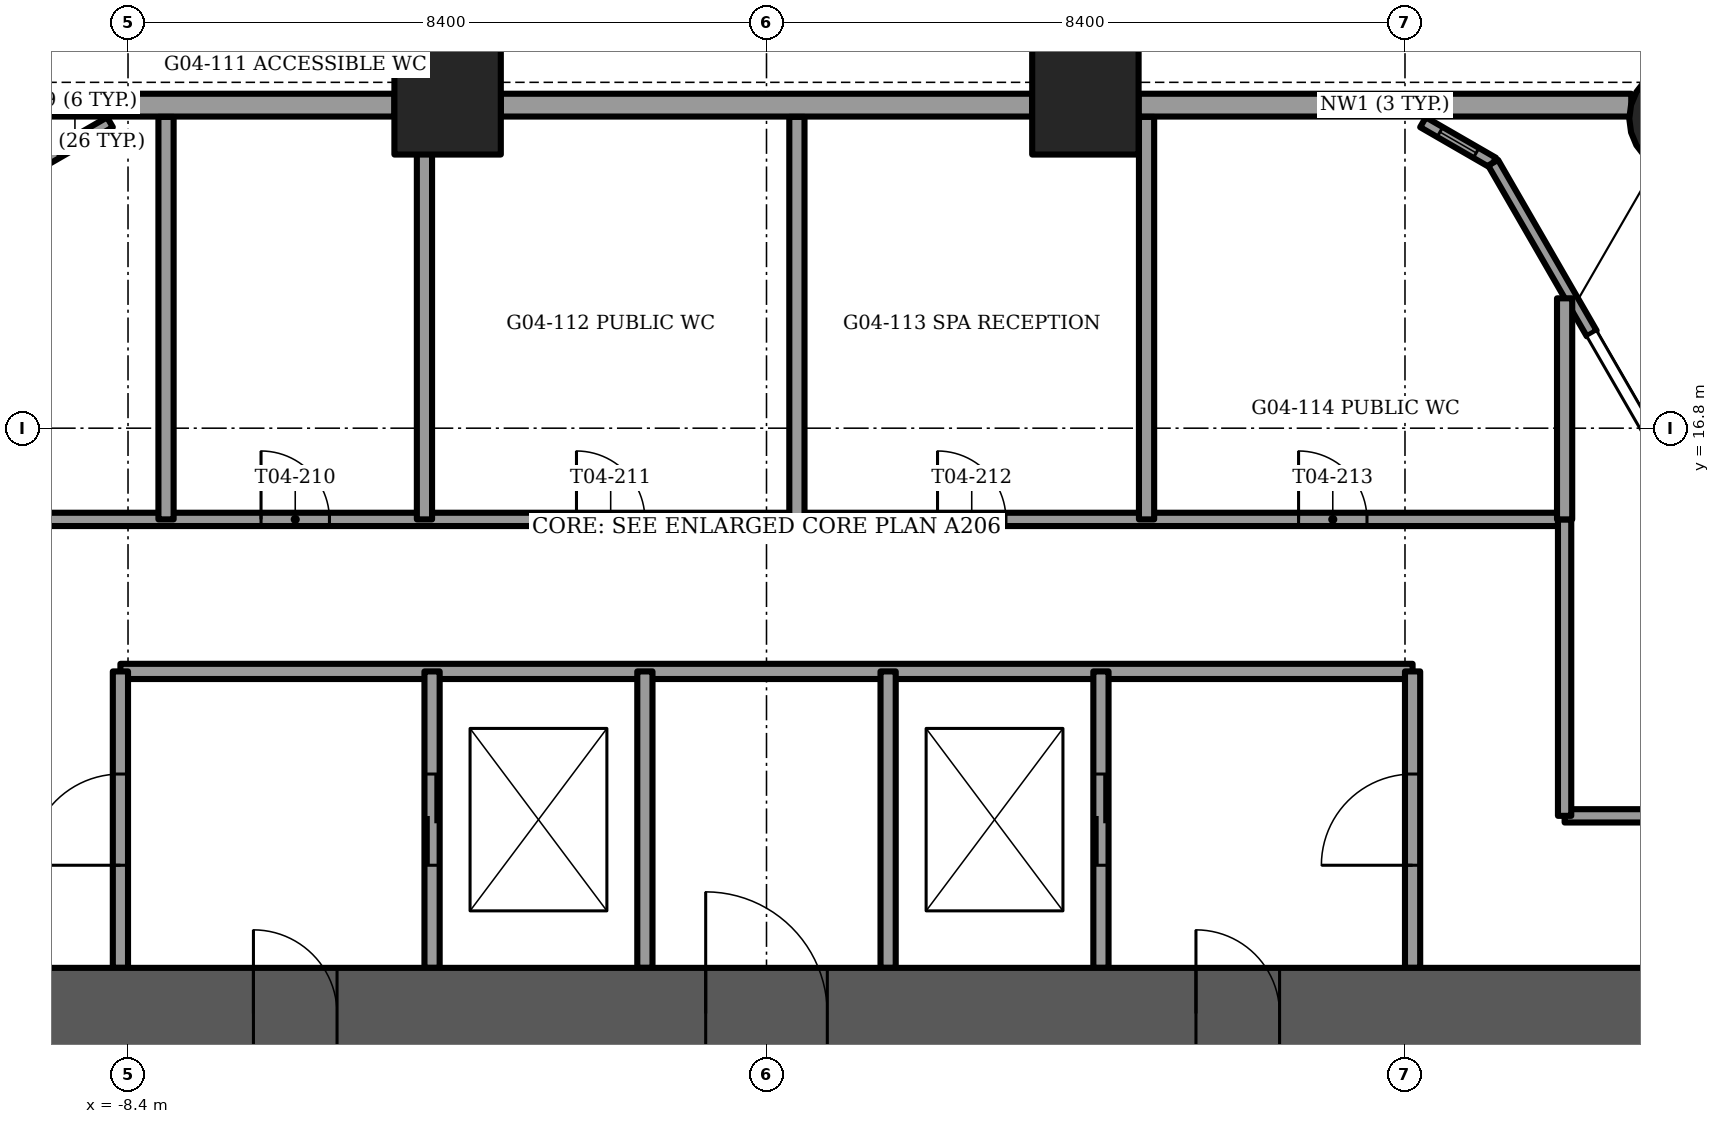
"""IFC4 building model, lengths in metres.
Left out: names, types, materials, properties, quantities, classifications, styles, units other than length and angle.
Written with IfcOpenShell. Run it as: python <this file> out.ifc"""

import sys

from ifc_helpers import new_model, si_unit, direction, frame, frame_2d, origin, origin_2d, place, context, subcontext, project, spatial, rectangle, circle, extrude, element, fill, save


model = new_model("IFC4")
c1 = context("Model", 3, precision=1e-05, world=origin(), true_north=direction((0.0, 1.0)))
c2 = subcontext(c1, "Body", "Model", "MODEL_VIEW")
j1 = project(units=[si_unit("LENGTHUNIT", "METRE"), si_unit("PLANEANGLEUNIT", "RADIAN")], contexts=[c1])
p1 = place(None, origin())
s1 = spatial("IfcSite", under=j1, at=p1, CompositionType="ELEMENT")
p2 = place(p1, origin())
s2 = spatial("IfcBuilding", under=s1, at=p2, CompositionType="ELEMENT")
p3 = place(p2, frame((0.0, 0.0, 19.0)))
s3 = spatial("IfcBuildingStorey", under=s2, at=p3, CompositionType="ELEMENT", Elevation=19.0)
p4 = place(p3, frame((12.051, 20.872, -1.2), z_axis=(0.0, 0.0, 1.0), x_axis=(1.0, 0.0, 0.0)))
e1 = element("IfcColumn", 1, at=p4, inside=s3, PredefinedType="COLUMN", context=c2, shape_type="SweptSolid", body=[
    extrude(circle(Radius=0.7, at=origin_2d()), origin(), (0.0, 0.0, 1.0), 4.5),
])
for number, where, z_axis, x_axis in (
    (2, (4.195, 21.1, -1.2), (0.0, 0.0, 1.0), (1.0, 0.0, 0.0)),
    (3, (-4.195, 21.1, -1.2), (0.0, 0.0, 1.0), (1.0, 0.0, 0.0)),
):
    element("IfcColumn", number, at=place(p3, frame(where, z_axis=z_axis, x_axis=x_axis)), inside=s3, PredefinedType="COLUMN", context=c2, shape_type="SweptSolid", body=[
        extrude(rectangle(XDim=1.4, YDim=1.4, at=origin_2d()), origin(), (0.0, 0.0, 1.0), 4.5),
    ])
p5 = place(p3, frame((-12.0, 9.1, -0.3), z_axis=(0.0, 0.0, 1.0), x_axis=(1.0, 0.0, 0.0)))
e4 = element("IfcWall", 4, at=p5, inside=s3, PredefinedType="SHEAR", context=c2, shape_type="SweptSolid", body=[
    extrude(rectangle(XDim=24.0, YDim=1.2, at=frame_2d((12.0, 0.0))), origin(), (0.0, 0.0, 1.0), 4.5),
])
p6 = place(p5, frame((11.2, 0.0, 0.0)))
e5 = element("IfcOpeningElement", 5, at=p6, cuts=e4, PredefinedType="OPENING", context=c2, shape_type="SweptSolid", body=[
    extrude(rectangle(XDim=1.6, YDim=2.1, at=frame_2d((0.8, 1.05))), frame((0.0, 0.6, 0.0), z_axis=(0.0, -1.0, 0.0), x_axis=(1.0, 0.0, 0.0)), (0.0, 0.0, 1.0), 1.2),
])
p7 = place(p5, frame((5.25, 0.0, 0.0)))
e6 = element("IfcOpeningElement", 6, at=p7, cuts=e4, PredefinedType="OPENING", context=c2, shape_type="SweptSolid", body=[
    extrude(rectangle(XDim=1.1, YDim=2.1, at=frame_2d((0.55, 1.05))), frame((0.0, 0.6, 0.0), z_axis=(0.0, -1.0, 0.0), x_axis=(1.0, 0.0, 0.0)), (0.0, 0.0, 1.0), 1.2),
])
p8 = place(p5, frame((17.65, 0.0, 0.0)))
e7 = element("IfcOpeningElement", 7, at=p8, cuts=e4, PredefinedType="OPENING", context=c2, shape_type="SweptSolid", body=[
    extrude(rectangle(XDim=1.1, YDim=2.1, at=frame_2d((0.55, 1.05))), frame((0.0, 0.6, 0.0), z_axis=(0.0, -1.0, 0.0), x_axis=(1.0, 0.0, 0.0)), (0.0, 0.0, 1.0), 1.2),
])
p9 = place(p3, frame((11.377, 21.05, 0.0), z_axis=(0.0, 0.0, 1.0), x_axis=(-1.0, 0.0, 0.0)))
e8 = element("IfcWall", 8, at=p9, inside=s3, PredefinedType="SOLIDWALL", context=c2, shape_type="SweptSolid", body=[
    extrude(rectangle(XDim=6.481, YDim=0.3, at=frame_2d((3.241, 0.0))), origin(), (0.0, 0.0, 1.0), 3.3),
])
p10 = place(p3, frame((3.495, 21.05, 0.0), z_axis=(0.0, 0.0, 1.0), x_axis=(-1.0, 0.0, 0.0)))
e9 = element("IfcWall", 9, at=p10, inside=s3, PredefinedType="SOLIDWALL", context=c2, shape_type="SweptSolid", body=[
    extrude(rectangle(XDim=6.991, YDim=0.3, at=frame_2d((3.495, 0.0))), origin(), (0.0, 0.0, 1.0), 3.3),
])
p11 = place(p3, frame((-4.896, 21.05, 0.0), z_axis=(0.0, 0.0, 1.0), x_axis=(-1.0, 0.0, 0.0)))
e10 = element("IfcWall", 10, at=p11, inside=s3, PredefinedType="SOLIDWALL", context=c2, shape_type="SweptSolid", body=[
    extrude(rectangle(XDim=6.481, YDim=0.3, at=frame_2d((3.241, 0.0))), origin(), (0.0, 0.0, 1.0), 3.3),
])
p12 = place(p3, frame((10.856, 18.046, 0.0), z_axis=(0.0, 0.0, 1.0), x_axis=(-0.499945140294, 0.866057074734, 0.0)))
e11 = element("IfcWall", 11, at=p12, inside=s3, PredefinedType="SOLIDWALL", context=c2, shape_type="SweptSolid", body=[
    extrude(rectangle(XDim=2.594, YDim=0.15, at=frame_2d((1.297, 0.0))), origin(), (0.0, 0.0, 1.0), 4.2),
])
p13 = place(p3, frame((-8.637, 20.825, 0.0), z_axis=(0.0, 0.0, 1.0), x_axis=(-0.866048165231, -0.499960573946, 0.0)))
e12 = element("IfcWall", 12, at=p13, inside=s3, PredefinedType="SOLIDWALL", context=c2, shape_type="SweptSolid", body=[
    extrude(rectangle(XDim=1.065, YDim=0.15, at=frame_2d((0.532, 0.0))), origin(), (0.0, 0.0, 1.0), 4.2),
])
p14 = place(p13, frame((0.258, 0.0, 0.15)))
e13 = element("IfcOpeningElement", 13, at=p14, cuts=e12, PredefinedType="OPENING", context=c2, shape_type="SweptSolid", body=[
    extrude(rectangle(XDim=0.55, YDim=3.6, at=frame_2d((0.275, 1.8))), frame((0.0, 0.075, 0.0), z_axis=(0.0, -1.0, 0.0), x_axis=(1.0, 0.0, 0.0)), (0.0, 0.0, 1.0), 0.15),
])
p15 = place(p3, frame((9.56, 20.292, 0.0), z_axis=(0.0, 0.0, 1.0), x_axis=(-0.866048165231, 0.499960573946, 0.0)))
e14 = element("IfcWall", 14, at=p15, inside=s3, PredefinedType="SOLIDWALL", context=c2, shape_type="SweptSolid", body=[
    extrude(rectangle(XDim=1.065, YDim=0.15, at=frame_2d((0.532, 0.0))), origin(), (0.0, 0.0, 1.0), 4.2),
])
p16 = place(p15, frame((0.258, 0.0, 0.15)))
e15 = element("IfcOpeningElement", 15, at=p16, cuts=e14, PredefinedType="OPENING", context=c2, shape_type="SweptSolid", body=[
    extrude(rectangle(XDim=0.55, YDim=3.6, at=frame_2d((0.275, 1.8))), frame((0.0, 0.075, 0.0), z_axis=(0.0, -1.0, 0.0), x_axis=(1.0, 0.0, 0.0)), (0.0, 0.0, 1.0), 0.15),
])
p17 = place(p3, frame((-8.5, 13.6, 0.0), z_axis=(0.0, 0.0, 1.0), x_axis=(1.0, 0.0, 0.0)))
e16 = element("IfcWall", 16, at=p17, inside=s3, PredefinedType="PARTITIONING", context=c2, shape_type="SweptSolid", body=[
    extrude(rectangle(XDim=17.0, YDim=0.2, at=frame_2d((8.5, 0.0))), origin(), (0.0, 0.0, 1.0), 4.2),
])
p18 = place(p3, frame((-8.5, 9.7, 0.0), z_axis=(0.0, 0.0, 1.0), x_axis=(0.0, 1.0, 0.0)))
e17 = element("IfcWall", 17, at=p18, inside=s3, PredefinedType="PARTITIONING", context=c2, shape_type="SweptSolid", body=[
    extrude(rectangle(XDim=3.9, YDim=0.2, at=frame_2d((1.95, 0.0))), origin(), (0.0, 0.0, 1.0), 4.2),
])
p19 = place(p18, frame((1.35, 0.0, 0.0)))
e18 = element("IfcOpeningElement", 18, at=p19, cuts=e17, PredefinedType="OPENING", context=c2, shape_type="SweptSolid", body=[
    extrude(rectangle(XDim=1.2, YDim=2.1, at=frame_2d((0.6, 1.05))), frame((0.0, 0.1, 0.0), z_axis=(0.0, -1.0, 0.0), x_axis=(1.0, 0.0, 0.0)), (0.0, 0.0, 1.0), 0.2),
])
p20 = place(p3, frame((8.5, 9.7, 0.0), z_axis=(0.0, 0.0, 1.0), x_axis=(0.0, 1.0, 0.0)))
e19 = element("IfcWall", 19, at=p20, inside=s3, PredefinedType="PARTITIONING", context=c2, shape_type="SweptSolid", body=[
    extrude(rectangle(XDim=3.9, YDim=0.2, at=frame_2d((1.95, 0.0))), origin(), (0.0, 0.0, 1.0), 4.2),
])
p21 = place(p20, frame((1.35, 0.0, 0.0)))
e20 = element("IfcOpeningElement", 20, at=p21, cuts=e19, PredefinedType="OPENING", context=c2, shape_type="SweptSolid", body=[
    extrude(rectangle(XDim=1.2, YDim=2.1, at=frame_2d((0.6, 1.05))), frame((0.0, 0.1, 0.0), z_axis=(0.0, -1.0, 0.0), x_axis=(1.0, 0.0, 0.0)), (0.0, 0.0, 1.0), 0.2),
])
p22 = place(p3, frame((-4.4, 9.7, 0.0), z_axis=(0.0, 0.0, 1.0), x_axis=(0.0, 1.0, 0.0)))
e21 = element("IfcWall", 21, at=p22, inside=s3, PredefinedType="PARTITIONING", context=c2, shape_type="SweptSolid", body=[
    extrude(rectangle(XDim=3.9, YDim=0.2, at=frame_2d((1.95, 0.0))), origin(), (0.0, 0.0, 1.0), 4.2),
])
p23 = place(p22, frame((1.35, 0.0, 0.0)))
e22 = element("IfcOpeningElement", 22, at=p23, cuts=e21, PredefinedType="OPENING", context=c2, shape_type="SweptSolid", body=[
    extrude(rectangle(XDim=1.2, YDim=2.1, at=frame_2d((0.6, 1.05))), frame((0.0, 0.1, 0.0), z_axis=(0.0, -1.0, 0.0), x_axis=(1.0, 0.0, 0.0)), (0.0, 0.0, 1.0), 0.2),
])
p24 = place(p3, frame((4.4, 9.7, 0.0), z_axis=(0.0, 0.0, 1.0), x_axis=(0.0, 1.0, 0.0)))
e23 = element("IfcWall", 23, at=p24, inside=s3, PredefinedType="PARTITIONING", context=c2, shape_type="SweptSolid", body=[
    extrude(rectangle(XDim=3.9, YDim=0.2, at=frame_2d((1.95, 0.0))), origin(), (0.0, 0.0, 1.0), 4.2),
])
p25 = place(p24, frame((1.35, 0.0, 0.0)))
e24 = element("IfcOpeningElement", 24, at=p25, cuts=e23, PredefinedType="OPENING", context=c2, shape_type="SweptSolid", body=[
    extrude(rectangle(XDim=1.2, YDim=2.1, at=frame_2d((0.6, 1.05))), frame((0.0, 0.1, 0.0), z_axis=(0.0, -1.0, 0.0), x_axis=(1.0, 0.0, 0.0)), (0.0, 0.0, 1.0), 0.2),
])
for number, where, z_axis, x_axis in (
    (25, (-1.6, 9.7, 0.0), (0.0, 0.0, 1.0), (0.0, 1.0, 0.0)),
    (26, (1.6, 9.7, 0.0), (0.0, 0.0, 1.0), (0.0, 1.0, 0.0)),
):
    element("IfcWall", number, at=place(p3, frame(where, z_axis=z_axis, x_axis=x_axis)), inside=s3, PredefinedType="PARTITIONING", context=c2, shape_type="SweptSolid", body=[
        extrude(rectangle(XDim=3.9, YDim=0.2, at=frame_2d((1.95, 0.0))), origin(), (0.0, 0.0, 1.0), 4.2),
    ])
p26 = place(p3, frame((10.5, 11.7, 0.0), z_axis=(0.0, 0.0, 1.0), x_axis=(1.0, 0.0, 0.0)))
e27 = element("IfcWall", 27, at=p26, inside=s3, PredefinedType="PARTITIONING", context=c2, shape_type="SweptSolid", body=[
    extrude(rectangle(XDim=3.999, YDim=0.175, at=frame_2d((2.0, 0.0))), origin(), (0.0, 0.0, 1.0), 4.2),
])
p27 = place(p3, frame((-10.5, 15.6, 0.0), z_axis=(0.0, 0.0, 1.0), x_axis=(1.0, 0.0, 0.0)))
e28 = element("IfcWall", 28, at=p27, inside=s3, PredefinedType="PARTITIONING", context=c2, shape_type="SweptSolid", body=[
    extrude(rectangle(XDim=21.0, YDim=0.175, at=frame_2d((10.5, 0.0))), origin(), (0.0, 0.0, 1.0), 4.2),
])
p28 = place(p27, frame((3.85, 0.0, 0.0)))
e29 = element("IfcOpeningElement", 29, at=p28, cuts=e28, PredefinedType="OPENING", context=c2, shape_type="SweptSolid", body=[
    extrude(rectangle(XDim=0.9, YDim=2.1, at=frame_2d((0.45, 1.05))), frame((0.0, 0.087, 0.0), z_axis=(0.0, -1.0, 0.0), x_axis=(1.0, 0.0, 0.0)), (0.0, 0.0, 1.0), 0.175),
])
p29 = place(p27, frame((8.0, 0.0, 0.0)))
e30 = element("IfcOpeningElement", 30, at=p29, cuts=e28, PredefinedType="OPENING", context=c2, shape_type="SweptSolid", body=[
    extrude(rectangle(XDim=0.9, YDim=2.1, at=frame_2d((0.45, 1.05))), frame((0.0, 0.087, 0.0), z_axis=(0.0, -1.0, 0.0), x_axis=(1.0, 0.0, 0.0)), (0.0, 0.0, 1.0), 0.175),
])
p30 = place(p27, frame((12.75, 0.0, 0.0)))
e31 = element("IfcOpeningElement", 31, at=p30, cuts=e28, PredefinedType="OPENING", context=c2, shape_type="SweptSolid", body=[
    extrude(rectangle(XDim=0.9, YDim=2.1, at=frame_2d((0.45, 1.05))), frame((0.0, 0.087, 0.0), z_axis=(0.0, -1.0, 0.0), x_axis=(1.0, 0.0, 0.0)), (0.0, 0.0, 1.0), 0.175),
])
p31 = place(p27, frame((17.5, 0.0, 0.0)))
e32 = element("IfcOpeningElement", 32, at=p31, cuts=e28, PredefinedType="OPENING", context=c2, shape_type="SweptSolid", body=[
    extrude(rectangle(XDim=0.9, YDim=2.1, at=frame_2d((0.45, 1.05))), frame((0.0, 0.087, 0.0), z_axis=(0.0, -1.0, 0.0), x_axis=(1.0, 0.0, 0.0)), (0.0, 0.0, 1.0), 0.175),
])
p32 = place(p3, frame((10.5, 11.7, 0.0), z_axis=(0.0, 0.0, 1.0), x_axis=(0.0, 1.0, 0.0)))
e33 = element("IfcWall", 33, at=p32, inside=s3, PredefinedType="PARTITIONING", context=c2, shape_type="SweptSolid", body=[
    extrude(rectangle(XDim=3.9, YDim=0.175, at=frame_2d((1.95, 0.0))), origin(), (0.0, 0.0, 1.0), 4.2),
])
p33 = place(p3, frame((-7.9, 15.6, 0.0), z_axis=(0.0, 0.0, 1.0), x_axis=(0.0, 1.0, 0.0)))
e34 = element("IfcWall", 34, at=p33, inside=s3, PredefinedType="PARTITIONING", context=c2, shape_type="SweptSolid", body=[
    extrude(rectangle(XDim=5.295, YDim=0.2, at=frame_2d((2.647, 0.0))), origin(), (0.0, 0.0, 1.0), 4.2),
])
p34 = place(p3, frame((-4.5, 15.6, 0.0), z_axis=(0.0, 0.0, 1.0), x_axis=(0.0, 1.0, 0.0)))
e35 = element("IfcWall", 35, at=p34, inside=s3, PredefinedType="PARTITIONING", context=c2, shape_type="SweptSolid", body=[
    extrude(rectangle(XDim=5.07, YDim=0.2, at=frame_2d((2.535, 0.0))), origin(), (0.0, 0.0, 1.0), 4.2),
])
for number, where, z_axis, x_axis in (
    (36, (0.4, 15.6, 0.0), (0.0, 0.0, 1.0), (0.0, 1.0, 0.0)),
    (37, (5.0, 15.6, 0.0), (0.0, 0.0, 1.0), (0.0, 1.0, 0.0)),
):
    element("IfcWall", number, at=place(p3, frame(where, z_axis=z_axis, x_axis=x_axis)), inside=s3, PredefinedType="PARTITIONING", context=c2, shape_type="SweptSolid", body=[
        extrude(rectangle(XDim=5.295, YDim=0.2, at=frame_2d((2.647, 0.0))), origin(), (0.0, 0.0, 1.0), 4.2),
    ])
p35 = place(p3, frame((10.5, 15.6, 0.0), z_axis=(0.0, 0.0, 1.0), x_axis=(0.0, 1.0, 0.0)))
e38 = element("IfcWall", 38, at=p35, inside=s3, PredefinedType="PARTITIONING", context=c2, shape_type="SweptSolid", body=[
    extrude(rectangle(XDim=2.908, YDim=0.2, at=frame_2d((1.454, 0.0))), origin(), (0.0, 0.0, 1.0), 4.2),
])
p36 = place(p14, origin())
e39 = element("IfcWindow", 39, at=p36, inside=s3, PartitioningType="SINGLE_PANEL", PredefinedType="WINDOW", context=c2, shape_type="SweptSolid", body=[
    extrude(rectangle(XDim=0.55, YDim=3.6, at=frame_2d((0.275, 1.8))), frame((0.0, 0.03, 0.0), z_axis=(0.0, -1.0, 0.0), x_axis=(1.0, 0.0, 0.0)), (0.0, 0.0, 1.0), 0.06),
])
fill(e13, e39)
p37 = place(p16, origin())
e40 = element("IfcWindow", 40, at=p37, inside=s3, PartitioningType="SINGLE_PANEL", PredefinedType="WINDOW", context=c2, shape_type="SweptSolid", body=[
    extrude(rectangle(XDim=0.55, YDim=3.6, at=frame_2d((0.275, 1.8))), frame((0.0, 0.03, 0.0), z_axis=(0.0, -1.0, 0.0), x_axis=(1.0, 0.0, 0.0)), (0.0, 0.0, 1.0), 0.06),
])
fill(e15, e40)
p38 = place(p6, origin())
e41 = element("IfcDoor", 41, at=p38, inside=s3, OperationType="DOUBLE_DOOR_SINGLE_SWING", PredefinedType="DOOR", context=c2, shape_type="SweptSolid", body=[
    extrude(rectangle(XDim=1.6, YDim=2.1, at=frame_2d((0.8, 1.05))), frame((0.0, 0.025, 0.0), z_axis=(0.0, -1.0, 0.0), x_axis=(1.0, 0.0, 0.0)), (0.0, 0.0, 1.0), 0.05),
])
fill(e5, e41)
p39 = place(p7, origin())
e42 = element("IfcDoor", 42, at=p39, inside=s3, OperationType="SINGLE_SWING_LEFT", PredefinedType="DOOR", context=c2, shape_type="SweptSolid", body=[
    extrude(rectangle(XDim=1.1, YDim=2.1, at=frame_2d((0.55, 1.05))), frame((0.0, 0.025, 0.0), z_axis=(0.0, -1.0, 0.0), x_axis=(1.0, 0.0, 0.0)), (0.0, 0.0, 1.0), 0.05),
])
fill(e6, e42)
p40 = place(p8, origin())
e43 = element("IfcDoor", 43, at=p40, inside=s3, OperationType="SINGLE_SWING_RIGHT", PredefinedType="DOOR", context=c2, shape_type="SweptSolid", body=[
    extrude(rectangle(XDim=1.1, YDim=2.1, at=frame_2d((0.55, 1.05))), frame((0.0, 0.025, 0.0), z_axis=(0.0, -1.0, 0.0), x_axis=(1.0, 0.0, 0.0)), (0.0, 0.0, 1.0), 0.05),
])
fill(e7, e43)
p41 = place(p23, origin())
e44 = element("IfcDoor", 44, at=p41, inside=s3, OperationType="SLIDING_TO_LEFT", PredefinedType="DOOR", context=c2, shape_type="SweptSolid", body=[
    extrude(rectangle(XDim=1.2, YDim=2.1, at=frame_2d((0.6, 1.05))), frame((0.0, 0.025, 0.0), z_axis=(0.0, -1.0, 0.0), x_axis=(1.0, 0.0, 0.0)), (0.0, 0.0, 1.0), 0.05),
])
fill(e22, e44)
p42 = place(p19, origin())
e45 = element("IfcDoor", 45, at=p42, inside=s3, OperationType="SINGLE_SWING_LEFT", PredefinedType="DOOR", context=c2, shape_type="SweptSolid", body=[
    extrude(rectangle(XDim=1.2, YDim=2.1, at=frame_2d((0.6, 1.05))), frame((0.0, 0.025, 0.0), z_axis=(0.0, -1.0, 0.0), x_axis=(1.0, 0.0, 0.0)), (0.0, 0.0, 1.0), 0.05),
])
fill(e18, e45)
p43 = place(p25, origin())
e46 = element("IfcDoor", 46, at=p43, inside=s3, OperationType="SLIDING_TO_LEFT", PredefinedType="DOOR", context=c2, shape_type="SweptSolid", body=[
    extrude(rectangle(XDim=1.2, YDim=2.1, at=frame_2d((0.6, 1.05))), frame((0.0, 0.025, 0.0), z_axis=(0.0, -1.0, 0.0), x_axis=(1.0, 0.0, 0.0)), (0.0, 0.0, 1.0), 0.05),
])
fill(e24, e46)
p44 = place(p21, origin())
e47 = element("IfcDoor", 47, at=p44, inside=s3, OperationType="SINGLE_SWING_LEFT", PredefinedType="DOOR", context=c2, shape_type="SweptSolid", body=[
    extrude(rectangle(XDim=1.2, YDim=2.1, at=frame_2d((0.6, 1.05))), frame((0.0, 0.025, 0.0), z_axis=(0.0, -1.0, 0.0), x_axis=(1.0, 0.0, 0.0)), (0.0, 0.0, 1.0), 0.05),
])
fill(e20, e47)
p45 = place(p28, origin())
e48 = element("IfcDoor", 48, at=p45, inside=s3, OperationType="SINGLE_SWING_RIGHT", PredefinedType="DOOR", context=c2, shape_type="SweptSolid", body=[
    extrude(rectangle(XDim=0.9, YDim=2.1, at=frame_2d((0.45, 1.05))), frame((0.0, 0.025, 0.0), z_axis=(0.0, -1.0, 0.0), x_axis=(1.0, 0.0, 0.0)), (0.0, 0.0, 1.0), 0.05),
])
fill(e29, e48)
p46 = place(p29, origin())
e49 = element("IfcDoor", 49, at=p46, inside=s3, OperationType="SINGLE_SWING_LEFT", PredefinedType="DOOR", context=c2, shape_type="SweptSolid", body=[
    extrude(rectangle(XDim=0.9, YDim=2.1, at=frame_2d((0.45, 1.05))), frame((0.0, 0.025, 0.0), z_axis=(0.0, -1.0, 0.0), x_axis=(1.0, 0.0, 0.0)), (0.0, 0.0, 1.0), 0.05),
])
fill(e30, e49)
p47 = place(p30, origin())
e50 = element("IfcDoor", 50, at=p47, inside=s3, OperationType="SINGLE_SWING_RIGHT", PredefinedType="DOOR", context=c2, shape_type="SweptSolid", body=[
    extrude(rectangle(XDim=0.9, YDim=2.1, at=frame_2d((0.45, 1.05))), frame((0.0, 0.025, 0.0), z_axis=(0.0, -1.0, 0.0), x_axis=(1.0, 0.0, 0.0)), (0.0, 0.0, 1.0), 0.05),
])
fill(e31, e50)
p48 = place(p31, origin())
e51 = element("IfcDoor", 51, at=p48, inside=s3, OperationType="SINGLE_SWING_LEFT", PredefinedType="DOOR", context=c2, shape_type="SweptSolid", body=[
    extrude(rectangle(XDim=0.9, YDim=2.1, at=frame_2d((0.45, 1.05))), frame((0.0, 0.025, 0.0), z_axis=(0.0, -1.0, 0.0), x_axis=(1.0, 0.0, 0.0)), (0.0, 0.0, 1.0), 0.05),
])
fill(e32, e51)
save(model, sys.argv[1])
